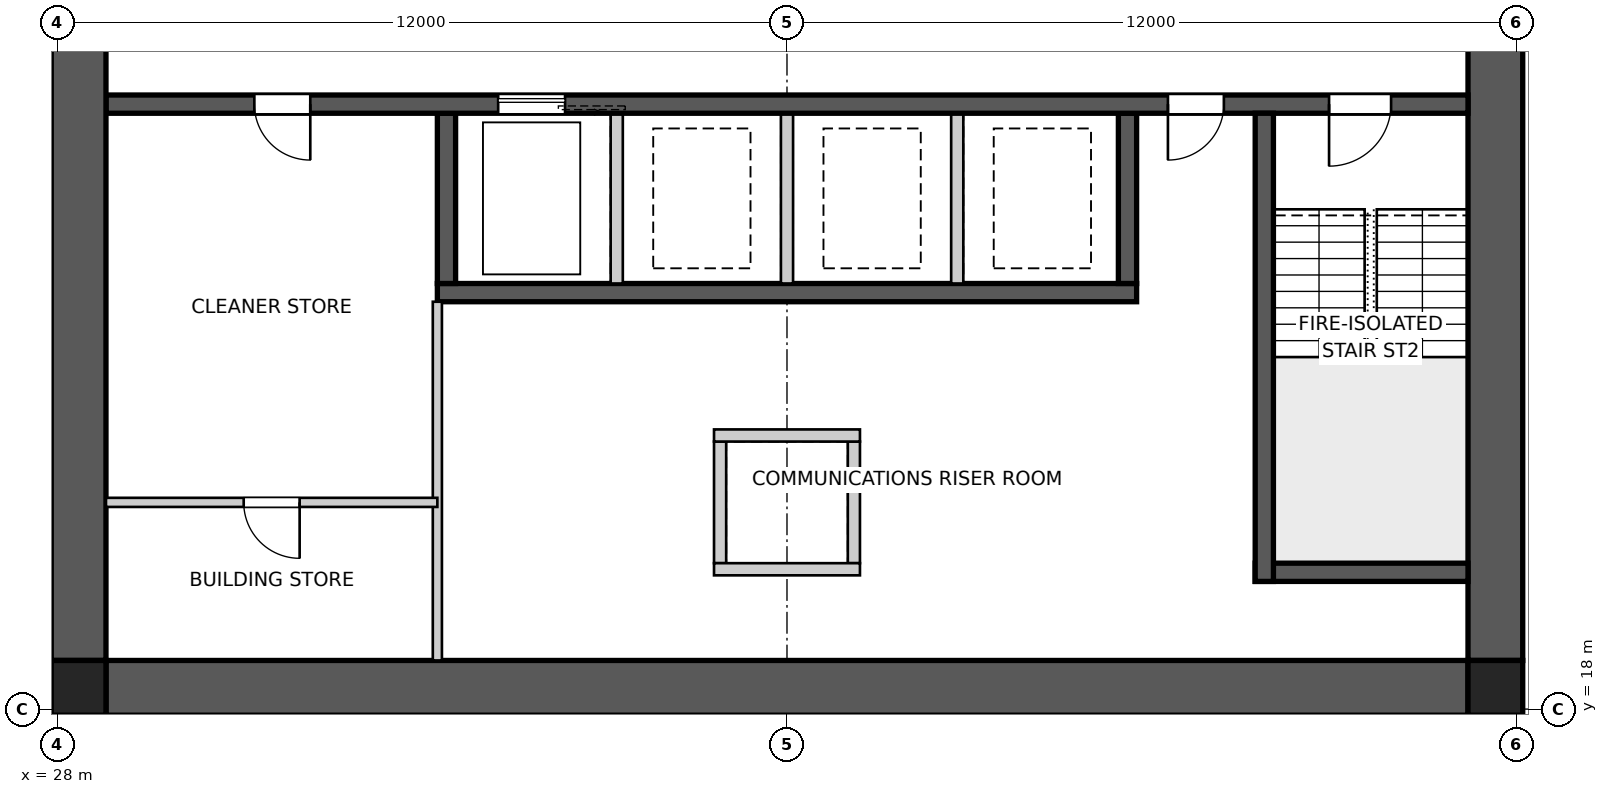
"""IFC4 building model, lengths in metres.
Left out: names, types, materials, properties, quantities, classifications, styles, units other than length and angle.
Written with IfcOpenShell. Run it as: python <this file> out.ifc"""

import sys

from ifc_helpers import new_model, si_unit, direction, frame, frame_2d, origin, origin_2d, place, context, subcontext, project, spatial, polyline, rectangle, outline, extrude, element, fill, save


model = new_model("IFC4")
c1 = context("Model", 3, precision=1e-05, world=origin(), true_north=direction((0.0, 1.0)))
c2 = subcontext(c1, "Body", "Model", "MODEL_VIEW")
j1 = project(units=[si_unit("LENGTHUNIT", "METRE"), si_unit("PLANEANGLEUNIT", "RADIAN")], contexts=[c1])
p1 = place(None, origin())
s1 = spatial("IfcSite", under=j1, at=p1, CompositionType="ELEMENT")
p2 = place(p1, origin())
s2 = spatial("IfcBuilding", under=s1, at=p2, CompositionType="ELEMENT")
p3 = place(p2, frame((0.0, 0.0, 21.8)))
s3 = spatial("IfcBuildingStorey", under=s2, at=p3, CompositionType="ELEMENT", Elevation=21.8)
p4 = place(p3, frame((51.2, 18.35, 0.0), z_axis=(0.0, 0.0, 1.0), x_axis=(-1.0, 0.0, 0.0)))
e1 = element("IfcWall", 1, at=p4, inside=s3, PredefinedType="SHEAR", context=c2, shape_type="SweptSolid", body=[
    extrude(outline(polyline([(0.0, -0.45), (22.4, -0.45), (22.4, -0.025), (22.85, -0.025), (22.85, 0.025), (22.4, 0.025), (22.4, 0.45), (0.0, 0.45), (0.0, 0.025), (-0.45, 0.025), (-0.45, -0.025), (0.0, -0.025), (0.0, -0.45)])), origin(), (0.0, 0.0, 1.0), 3.4),
])
p5 = place(p3, frame((51.65, 18.8, 0.0), z_axis=(0.0, 0.0, 1.0), x_axis=(0.0, 1.0, 0.0)))
e2 = element("IfcWall", 2, at=p5, inside=s3, PredefinedType="SHEAR", context=c2, shape_type="SweptSolid", body=[
    extrude(outline(polyline([(0.0, -0.45), (22.4, -0.45), (22.4, -0.025), (22.85, -0.025), (22.85, 0.025), (22.4, 0.025), (22.4, 0.45), (0.0, 0.45), (0.0, 0.025), (-0.45, 0.025), (-0.45, -0.025), (0.0, -0.025), (0.0, -0.45)])), origin(), (0.0, 0.0, 1.0), 3.4),
])
p6 = place(p5, frame((11.14, 0.0, 0.0)))
e3 = element("IfcOpeningElement", 3, at=p6, cuts=e2, PredefinedType="OPENING", context=c2, shape_type="SweptSolid", body=[
    extrude(rectangle(XDim=1.02, YDim=2.4, at=frame_2d((0.51, 1.2))), frame((0.0, 0.46, 0.0), z_axis=(0.0, -1.0, 0.0), x_axis=(1.0, 0.0, 0.0)), (0.0, 0.0, 1.0), 0.92),
])
p7 = place(p3, frame((28.35, 41.2, 0.0), z_axis=(0.0, 0.0, 1.0), x_axis=(0.0, -1.0, 0.0)))
e4 = element("IfcWall", 4, at=p7, inside=s3, PredefinedType="SHEAR", context=c2, shape_type="SweptSolid", body=[
    extrude(outline(polyline([(0.0, -0.45), (22.4, -0.45), (22.4, -0.025), (22.85, -0.025), (22.85, 0.025), (22.4, 0.025), (22.4, 0.45), (0.0, 0.45), (0.0, 0.025), (-0.45, 0.025), (-0.45, -0.025), (0.0, -0.025), (0.0, -0.45)])), origin(), (0.0, 0.0, 1.0), 3.4),
])
p8 = place(p7, frame((11.14, 0.0, 0.0)))
e5 = element("IfcOpeningElement", 5, at=p8, cuts=e4, PredefinedType="OPENING", context=c2, shape_type="SweptSolid", body=[
    extrude(rectangle(XDim=1.02, YDim=2.4, at=frame_2d((0.51, 1.2))), frame((0.0, 0.46, 0.0), z_axis=(0.0, -1.0, 0.0), x_axis=(1.0, 0.0, 0.0)), (0.0, 0.0, 1.0), 0.92),
])
p9 = place(p3, frame((51.2, 27.95, 0.0), z_axis=(0.0, 0.0, 1.0), x_axis=(-1.0, 0.0, 0.0)))
e6 = element("IfcWall", 6, at=p9, inside=s3, PredefinedType="SHEAR", context=c2, shape_type="SweptSolid", body=[
    extrude(rectangle(XDim=22.4, YDim=0.3, at=frame_2d((11.2, 0.0))), origin(), (0.0, 0.0, 1.0), 3.4),
])
p10 = place(p9, frame((19.04, 0.0, 0.0)))
e7 = element("IfcOpeningElement", 7, at=p10, cuts=e6, PredefinedType="OPENING", context=c2, shape_type="SweptSolid", body=[
    extrude(rectangle(XDim=0.92, YDim=2.1, at=frame_2d((0.46, 1.05))), frame((0.0, 0.16, 0.0), z_axis=(0.0, -1.0, 0.0), x_axis=(1.0, 0.0, 0.0)), (0.0, 0.0, 1.0), 0.32),
])
p11 = place(p9, frame((1.265, 0.0, 0.0)))
e8 = element("IfcOpeningElement", 8, at=p11, cuts=e6, PredefinedType="OPENING", context=c2, shape_type="SweptSolid", body=[
    extrude(rectangle(XDim=1.02, YDim=2.1, at=frame_2d((0.51, 1.05))), frame((0.0, 0.16, 0.0), z_axis=(0.0, -1.0, 0.0), x_axis=(1.0, 0.0, 0.0)), (0.0, 0.0, 1.0), 0.32),
])
p12 = place(p9, frame((4.015, 0.0, 0.0)))
e9 = element("IfcOpeningElement", 9, at=p12, cuts=e6, PredefinedType="OPENING", context=c2, shape_type="SweptSolid", body=[
    extrude(rectangle(XDim=0.92, YDim=2.1, at=frame_2d((0.46, 1.05))), frame((0.0, 0.16, 0.0), z_axis=(0.0, -1.0, 0.0), x_axis=(1.0, 0.0, 0.0)), (0.0, 0.0, 1.0), 0.32),
])
p13 = place(p9, frame((14.85, 0.0, 0.0)))
e10 = element("IfcOpeningElement", 10, at=p13, cuts=e6, PredefinedType="OPENING", context=c2, shape_type="SweptSolid", body=[
    extrude(rectangle(XDim=1.1, YDim=2.1, at=frame_2d((0.55, 1.05))), frame((0.0, 0.16, 0.0), z_axis=(0.0, -1.0, 0.0), x_axis=(1.0, 0.0, 0.0)), (0.0, 0.0, 1.0), 0.32),
])
p14 = place(p3, frame((45.75, 24.85, 0.0), z_axis=(0.0, 0.0, 1.0), x_axis=(-1.0, 0.0, 0.0)))
e11 = element("IfcWall", 11, at=p14, inside=s3, PredefinedType="SHEAR", context=c2, shape_type="SweptSolid", body=[
    extrude(rectangle(XDim=11.5, YDim=0.3, at=frame_2d((5.75, 0.0))), origin(), (0.0, 0.0, 1.0), 3.4),
])
p15 = place(p3, frame((45.6, 27.8, 0.0), z_axis=(0.0, 0.0, 1.0), x_axis=(0.0, -1.0, 0.0)))
e12 = element("IfcWall", 12, at=p15, inside=s3, PredefinedType="SHEAR", context=c2, shape_type="SweptSolid", body=[
    extrude(rectangle(XDim=2.8, YDim=0.3, at=frame_2d((1.4, 0.0))), origin(), (0.0, 0.0, 1.0), 3.4),
])
for number, where, z_axis, x_axis in (
    (13, (42.8, 27.8, 0.0), (0.0, 0.0, 1.0), (0.0, -1.0, 0.0)),
    (14, (40.0, 27.8, 0.0), (0.0, 0.0, 1.0), (0.0, -1.0, 0.0)),
    (15, (37.2, 27.8, 0.0), (0.0, 0.0, 1.0), (0.0, -1.0, 0.0)),
):
    element("IfcWall", number, at=place(p3, frame(where, z_axis=z_axis, x_axis=x_axis)), inside=s3, PredefinedType="SOLIDWALL", context=c2, shape_type="SweptSolid", body=[
        extrude(rectangle(XDim=2.8, YDim=0.2, at=frame_2d((1.4, 0.0))), origin(), (0.0, 0.0, 1.0), 3.4),
    ])
p16 = place(p3, frame((34.4, 27.8, 0.0), z_axis=(0.0, 0.0, 1.0), x_axis=(0.0, -1.0, 0.0)))
e16 = element("IfcWall", 16, at=p16, inside=s3, PredefinedType="SHEAR", context=c2, shape_type="SweptSolid", body=[
    extrude(rectangle(XDim=2.8, YDim=0.3, at=frame_2d((1.4, 0.0))), origin(), (0.0, 0.0, 1.0), 3.4),
])
p17 = place(p3, frame((47.85, 27.8, 0.0), z_axis=(0.0, 0.0, 1.0), x_axis=(0.0, -1.0, 0.0)))
e17 = element("IfcWall", 17, at=p17, inside=s3, PredefinedType="SHEAR", context=c2, shape_type="SweptSolid", body=[
    extrude(rectangle(XDim=7.7, YDim=0.3, at=frame_2d((3.85, 0.0))), origin(), (0.0, 0.0, 1.0), 3.4),
])
p18 = place(p3, frame((51.2, 20.25, 0.0), z_axis=(0.0, 0.0, 1.0), x_axis=(-1.0, 0.0, 0.0)))
e18 = element("IfcWall", 18, at=p18, inside=s3, PredefinedType="SHEAR", context=c2, shape_type="SweptSolid", body=[
    extrude(rectangle(XDim=3.5, YDim=0.3, at=frame_2d((1.75, 0.0))), origin(), (0.0, 0.0, 1.0), 3.4),
])
for number, where, z_axis, x_axis in (
    (19, (38.9, 22.4, 0.0), (0.0, 0.0, 1.0), (0.0, -1.0, 0.0)),
    (20, (41.1, 22.4, 0.0), (0.0, 0.0, 1.0), (0.0, -1.0, 0.0)),
):
    element("IfcWall", number, at=place(p3, frame(where, z_axis=z_axis, x_axis=x_axis)), inside=s3, PredefinedType="SOLIDWALL", context=c2, shape_type="SweptSolid", body=[
        extrude(rectangle(XDim=2.0, YDim=0.2, at=frame_2d((1.0, 0.0))), origin(), (0.0, 0.0, 1.0), 3.4),
    ])
for number, where, z_axis, x_axis in (
    (21, (38.8, 22.5, 0.0), (0.0, 0.0, 1.0), (1.0, 0.0, 0.0)),
    (22, (38.8, 20.3, 0.0), (0.0, 0.0, 1.0), (1.0, 0.0, 0.0)),
):
    element("IfcWall", number, at=place(p3, frame(where, z_axis=z_axis, x_axis=x_axis)), inside=s3, PredefinedType="SOLIDWALL", context=c2, shape_type="SweptSolid", body=[
        extrude(rectangle(XDim=2.4, YDim=0.2, at=frame_2d((1.2, 0.0))), origin(), (0.0, 0.0, 1.0), 3.4),
    ])
for number, where, z_axis, x_axis in (
    (23, (28.35, 18.35, 0.0), (0.0, 0.0, 1.0), (1.0, 0.0, 0.0)),
    (24, (51.65, 18.35, 0.0), (0.0, 0.0, 1.0), (1.0, 0.0, 0.0)),
):
    element("IfcColumn", number, at=place(p3, frame(where, z_axis=z_axis, x_axis=x_axis)), inside=s3, PredefinedType="COLUMN", context=c2, shape_type="SweptSolid", body=[
        extrude(rectangle(XDim=0.9, YDim=0.9, at=origin_2d()), origin(), (0.0, 0.0, 1.0), 3.4),
    ])
p19 = place(p3, frame((34.25, 18.8, 0.0), z_axis=(0.0, 0.0, 1.0), x_axis=(0.0, 1.0, 0.0)))
e25 = element("IfcWall", 25, at=p19, inside=s3, PredefinedType="SOLIDWALL", context=c2, shape_type="SweptSolid", body=[
    extrude(rectangle(XDim=5.9, YDim=0.15, at=frame_2d((2.95, 0.0))), origin(), (0.0, 0.0, 1.0), 3.25),
])
p20 = place(p3, frame((34.25, 21.4, 0.0), z_axis=(0.0, 0.0, 1.0), x_axis=(-1.0, 0.0, 0.0)))
e26 = element("IfcWall", 26, at=p20, inside=s3, PredefinedType="SOLIDWALL", context=c2, shape_type="SweptSolid", body=[
    extrude(rectangle(XDim=5.45, YDim=0.15, at=frame_2d((2.725, 0.0))), origin(), (0.0, 0.0, 1.0), 3.25),
])
p21 = place(p20, frame((2.265, 0.0, 0.0)))
e27 = element("IfcOpeningElement", 27, at=p21, cuts=e26, PredefinedType="OPENING", context=c2, shape_type="SweptSolid", body=[
    extrude(rectangle(XDim=0.92, YDim=2.1, at=frame_2d((0.46, 1.05))), frame((0.0, 0.085, 0.0), z_axis=(0.0, -1.0, 0.0), x_axis=(1.0, 0.0, 0.0)), (0.0, 0.0, 1.0), 0.17),
])
p22 = place(p10, origin())
e28 = element("IfcDoor", 28, at=p22, inside=s3, OperationType="SINGLE_SWING_LEFT", PredefinedType="DOOR", context=c2, shape_type="SweptSolid", body=[
    extrude(rectangle(XDim=0.92, YDim=2.1, at=frame_2d((0.46, 1.05))), frame((0.0, 0.025, 0.0), z_axis=(0.0, -1.0, 0.0), x_axis=(1.0, 0.0, 0.0)), (0.0, 0.0, 1.0), 0.05),
])
fill(e7, e28)
p23 = place(p11, origin())
e29 = element("IfcDoor", 29, at=p23, inside=s3, OperationType="SINGLE_SWING_RIGHT", PredefinedType="DOOR", context=c2, shape_type="SweptSolid", body=[
    extrude(rectangle(XDim=1.02, YDim=2.1, at=frame_2d((0.51, 1.05))), frame((0.0, 0.025, 0.0), z_axis=(0.0, -1.0, 0.0), x_axis=(1.0, 0.0, 0.0)), (0.0, 0.0, 1.0), 0.05),
])
fill(e8, e29)
p24 = place(p12, origin())
e30 = element("IfcDoor", 30, at=p24, inside=s3, OperationType="SINGLE_SWING_RIGHT", PredefinedType="DOOR", context=c2, shape_type="SweptSolid", body=[
    extrude(rectangle(XDim=0.92, YDim=2.1, at=frame_2d((0.46, 1.05))), frame((0.0, 0.025, 0.0), z_axis=(0.0, -1.0, 0.0), x_axis=(1.0, 0.0, 0.0)), (0.0, 0.0, 1.0), 0.05),
])
fill(e9, e30)
p25 = place(p21, origin())
e31 = element("IfcDoor", 31, at=p25, inside=s3, OperationType="SINGLE_SWING_LEFT", PredefinedType="DOOR", context=c2, shape_type="SweptSolid", body=[
    extrude(rectangle(XDim=0.92, YDim=2.1, at=frame_2d((0.46, 1.05))), frame((0.0, 0.025, 0.0), z_axis=(0.0, -1.0, 0.0), x_axis=(1.0, 0.0, 0.0)), (0.0, 0.0, 1.0), 0.05),
])
fill(e27, e31)
p26 = place(p13, origin())
e32 = element("IfcDoor", 32, at=p26, inside=s3, OperationType="SLIDING_TO_LEFT", PredefinedType="DOOR", context=c2, shape_type="SweptSolid", body=[
    extrude(rectangle(XDim=1.1, YDim=2.1, at=frame_2d((0.55, 1.05))), frame((0.0, 0.025, 0.0), z_axis=(0.0, -1.0, 0.0), x_axis=(1.0, 0.0, 0.0)), (0.0, 0.0, 1.0), 0.05),
])
fill(e10, e32)
save(model, sys.argv[1])
